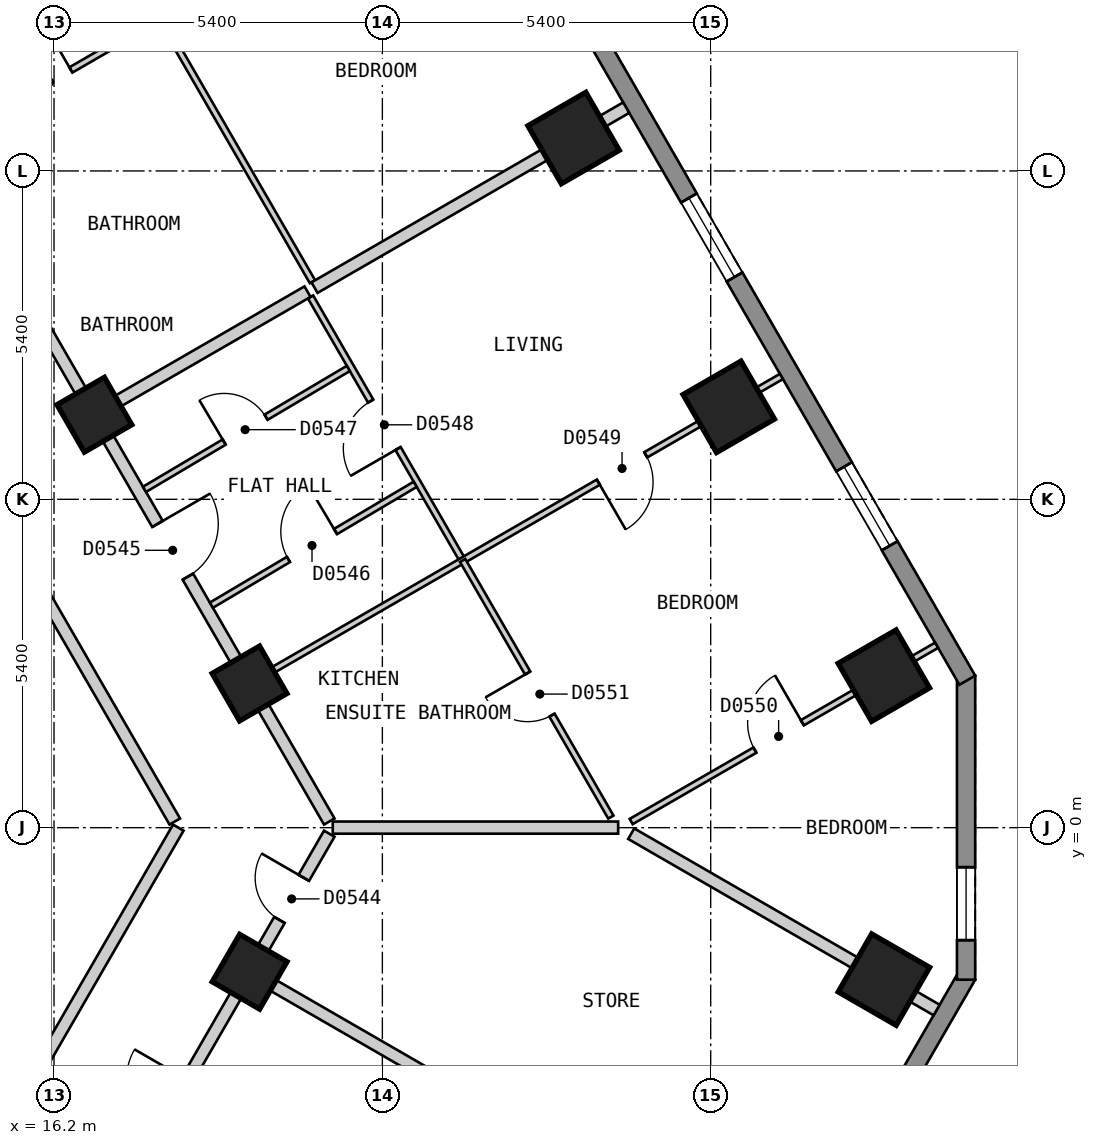
"""IFC4 building model, lengths in metres.
Left out: names, types, materials, properties, quantities, classifications, styles, units other than length and angle.
Written with IfcOpenShell. Run it as: python <this file> out.ifc"""

import sys

from ifc_helpers import new_model, si_unit, direction, frame, frame_2d, origin, origin_2d, place, context, subcontext, project, spatial, polyline, rectangle, outline, extrude, element, fill, save


model = new_model("IFC4")
c1 = context("Model", 3, precision=1e-05, world=origin(), true_north=direction((0.0, 1.0)))
c2 = subcontext(c1, "Body", "Model", "MODEL_VIEW")
j1 = project(units=[si_unit("LENGTHUNIT", "METRE"), si_unit("PLANEANGLEUNIT", "RADIAN")], contexts=[c1])
p1 = place(None, origin())
s1 = spatial("IfcSite", under=j1, at=p1, CompositionType="ELEMENT")
p2 = place(p1, origin())
s2 = spatial("IfcBuilding", under=s1, at=p2, CompositionType="ELEMENT")
p3 = place(p2, frame((0.0, 0.0, 44.4)))
s3 = spatial("IfcBuildingStorey", under=s2, at=p3, CompositionType="ELEMENT", Elevation=44.4)
for number, where, z_axis, x_axis in (
    (1, (29.849, -2.499, 0.0), (0.0, 0.0, 1.0), (0.5, 0.866, 0.0)),
    (2, (29.848, 2.5, 0.0), (0.0, 0.0, 1.0), (-0.5, 0.866, 0.0)),
    (3, (27.297, 6.921, 0.0), (0.0, 0.0, 1.0), (-0.5, 0.866, 0.0)),
    (4, (24.745, 11.341, 0.0), (0.0, 0.0, 1.0), (-0.5, 0.866, 0.0)),
):
    element("IfcColumn", number, at=place(p3, frame(where, z_axis=z_axis, x_axis=x_axis)), inside=s3, PredefinedType="COLUMN", context=c2, shape_type="SweptSolid", body=[
        extrude(rectangle(XDim=1.1, YDim=1.1, at=origin_2d()), origin(), (0.0, 0.0, 1.0), 3.0),
    ])
for number, where, z_axis, x_axis in (
    (5, (19.417, -2.369, 0.0), (0.0, 0.0, 1.0), (0.5, 0.866, 0.0)),
    (6, (19.416, 2.371, 0.0), (0.0, 0.0, 1.0), (-0.5, 0.866, 0.0)),
    (7, (16.864, 6.791, 0.0), (0.0, 0.0, 1.0), (-0.5, 0.866, 0.0)),
):
    element("IfcColumn", number, at=place(p3, frame(where, z_axis=z_axis, x_axis=x_axis)), inside=s3, PredefinedType="COLUMN", context=c2, shape_type="SweptSolid", body=[
        extrude(rectangle(XDim=0.9, YDim=0.9, at=origin_2d()), origin(), (0.0, 0.0, 1.0), 3.0),
    ])
p4 = place(p3, frame((17.71, -25.825, 0.0), z_axis=(0.0, 0.0, 1.0), x_axis=(0.500001938803, 0.866024284413, 0.0)))
e8 = element("IfcWall", 8, at=p4, inside=s3, PredefinedType="SOLIDWALL", context=c2, shape_type="SweptSolid", body=[
    extrude(outline(polyline([(0.0, -0.15), (27.02, -0.15), (26.94, 0.15), (0.08, 0.15), (0.0, -0.15)])), origin(), (0.0, 0.0, 1.0), 2.7),
])
p5 = place(p4, frame((2.553, 0.0, 0.15)))
e9 = element("IfcOpeningElement", 9, at=p5, cuts=e8, PredefinedType="OPENING", context=c2, shape_type="SweptSolid", body=[
    extrude(rectangle(XDim=1.5, YDim=2.1, at=frame_2d((0.75, 1.05))), frame((0.0, 0.16, 0.0), z_axis=(0.0, -1.0, 0.0), x_axis=(1.0, 0.0, 0.0)), (0.0, 0.0, 1.0), 0.32),
])
p6 = place(p4, frame((7.658, 0.0, 0.15)))
e10 = element("IfcOpeningElement", 10, at=p6, cuts=e8, PredefinedType="OPENING", context=c2, shape_type="SweptSolid", body=[
    extrude(rectangle(XDim=1.5, YDim=2.1, at=frame_2d((0.75, 1.05))), frame((0.0, 0.16, 0.0), z_axis=(0.0, -1.0, 0.0), x_axis=(1.0, 0.0, 0.0)), (0.0, 0.0, 1.0), 0.32),
])
p7 = place(p4, frame((12.761, 0.0, 0.15)))
e11 = element("IfcOpeningElement", 11, at=p7, cuts=e8, PredefinedType="OPENING", context=c2, shape_type="SweptSolid", body=[
    extrude(rectangle(XDim=1.5, YDim=2.1, at=frame_2d((0.75, 1.05))), frame((0.0, 0.16, 0.0), z_axis=(0.0, -1.0, 0.0), x_axis=(1.0, 0.0, 0.0)), (0.0, 0.0, 1.0), 0.32),
])
p8 = place(p4, frame((17.865, 0.0, 0.15)))
e12 = element("IfcOpeningElement", 12, at=p8, cuts=e8, PredefinedType="OPENING", context=c2, shape_type="SweptSolid", body=[
    extrude(rectangle(XDim=1.5, YDim=2.1, at=frame_2d((0.75, 1.05))), frame((0.0, 0.16, 0.0), z_axis=(0.0, -1.0, 0.0), x_axis=(1.0, 0.0, 0.0)), (0.0, 0.0, 1.0), 0.32),
])
p9 = place(p4, frame((22.969, 0.0, 0.15)))
e13 = element("IfcOpeningElement", 13, at=p9, cuts=e8, PredefinedType="OPENING", context=c2, shape_type="SweptSolid", body=[
    extrude(rectangle(XDim=1.5, YDim=2.1, at=frame_2d((0.75, 1.05))), frame((0.0, 0.16, 0.0), z_axis=(0.0, -1.0, 0.0), x_axis=(1.0, 0.0, 0.0)), (0.0, 0.0, 1.0), 0.32),
])
p10 = place(p3, frame((31.2, -2.5, 0.0), z_axis=(0.0, 0.0, 1.0), x_axis=(0.0, 1.0, 0.0)))
e14 = element("IfcWall", 14, at=p10, inside=s3, PredefinedType="SOLIDWALL", context=c2, shape_type="SweptSolid", body=[
    extrude(outline(polyline([(0.0, -0.15), (5.0, -0.15), (4.92, 0.15), (0.08, 0.15), (0.0, -0.15)])), origin(), (0.0, 0.0, 1.0), 2.7),
])
p11 = place(p10, frame((0.65, 0.0, 0.15)))
e15 = element("IfcOpeningElement", 15, at=p11, cuts=e14, PredefinedType="OPENING", context=c2, shape_type="SweptSolid", body=[
    extrude(rectangle(XDim=1.2, YDim=2.1, at=frame_2d((0.6, 1.05))), frame((0.0, 0.16, 0.0), z_axis=(0.0, -1.0, 0.0), x_axis=(1.0, 0.0, 0.0)), (0.0, 0.0, 1.0), 0.32),
])
p12 = place(p3, frame((31.22, 2.425, 0.0), z_axis=(0.0, 0.0, 1.0), x_axis=(-0.500001938803, 0.866024284413, 0.0)))
e16 = element("IfcWall", 16, at=p12, inside=s3, PredefinedType="SOLIDWALL", context=c2, shape_type="SweptSolid", body=[
    extrude(outline(polyline([(0.0, -0.15), (27.02, -0.15), (26.94, 0.15), (0.08, 0.15), (0.0, -0.15)])), origin(), (0.0, 0.0, 1.0), 2.7),
])
p13 = place(p12, frame((2.553, 0.0, 0.15)))
e17 = element("IfcOpeningElement", 17, at=p13, cuts=e16, PredefinedType="OPENING", context=c2, shape_type="SweptSolid", body=[
    extrude(rectangle(XDim=1.5, YDim=2.1, at=frame_2d((0.75, 1.05))), frame((0.0, 0.16, 0.0), z_axis=(0.0, -1.0, 0.0), x_axis=(1.0, 0.0, 0.0)), (0.0, 0.0, 1.0), 0.32),
])
p14 = place(p12, frame((7.657, 0.0, 0.15)))
e18 = element("IfcOpeningElement", 18, at=p14, cuts=e16, PredefinedType="OPENING", context=c2, shape_type="SweptSolid", body=[
    extrude(rectangle(XDim=1.5, YDim=2.1, at=frame_2d((0.75, 1.05))), frame((0.0, 0.16, 0.0), z_axis=(0.0, -1.0, 0.0), x_axis=(1.0, 0.0, 0.0)), (0.0, 0.0, 1.0), 0.32),
])
p15 = place(p12, frame((12.761, 0.0, 0.15)))
e19 = element("IfcOpeningElement", 19, at=p15, cuts=e16, PredefinedType="OPENING", context=c2, shape_type="SweptSolid", body=[
    extrude(rectangle(XDim=1.5, YDim=2.1, at=frame_2d((0.75, 1.05))), frame((0.0, 0.16, 0.0), z_axis=(0.0, -1.0, 0.0), x_axis=(1.0, 0.0, 0.0)), (0.0, 0.0, 1.0), 0.32),
])
p16 = place(p12, frame((17.865, 0.0, 0.15)))
e20 = element("IfcOpeningElement", 20, at=p16, cuts=e16, PredefinedType="OPENING", context=c2, shape_type="SweptSolid", body=[
    extrude(rectangle(XDim=1.5, YDim=2.1, at=frame_2d((0.75, 1.05))), frame((0.0, 0.16, 0.0), z_axis=(0.0, -1.0, 0.0), x_axis=(1.0, 0.0, 0.0)), (0.0, 0.0, 1.0), 0.32),
])
p17 = place(p12, frame((22.969, 0.0, 0.15)))
e21 = element("IfcOpeningElement", 21, at=p17, cuts=e16, PredefinedType="OPENING", context=c2, shape_type="SweptSolid", body=[
    extrude(rectangle(XDim=1.5, YDim=2.1, at=frame_2d((0.75, 1.05))), frame((0.0, 0.16, 0.0), z_axis=(0.0, -1.0, 0.0), x_axis=(1.0, 0.0, 0.0)), (0.0, 0.0, 1.0), 0.32),
])
p18 = place(p3, frame((9.18, 15.7, 0.0), z_axis=(0.0, 0.0, 1.0), x_axis=(0.500003652032, -0.866023295272, 0.0)))
e22 = element("IfcWall", 22, at=p18, inside=s3, PredefinedType="PARTITIONING", context=c2, shape_type="SweptSolid", body=[
    extrude(rectangle(XDim=18.012, YDim=0.2, at=frame_2d((9.006, 0.0))), origin(), (0.0, 0.0, 1.0), 2.7),
])
p19 = place(p18, frame((8.556, 0.0, 0.0)))
e23 = element("IfcOpeningElement", 23, at=p19, cuts=e22, PredefinedType="OPENING", context=c2, shape_type="SweptSolid", body=[
    extrude(rectangle(XDim=0.9, YDim=2.1, at=frame_2d((0.45, 1.05))), frame((0.0, 0.11, 0.0), z_axis=(0.0, -1.0, 0.0), x_axis=(1.0, 0.0, 0.0)), (0.0, 0.0, 1.0), 0.22),
])
p20 = place(p3, frame((10.45, 17.9, 0.0), z_axis=(0.0, 0.0, 1.0), x_axis=(0.500034352617, -0.866005569383, 0.0)))
e24 = element("IfcWall", 24, at=p20, inside=s3, PredefinedType="PARTITIONING", context=c2, shape_type="SweptSolid", body=[
    extrude(rectangle(XDim=20.553, YDim=0.2, at=frame_2d((10.276, 0.0))), origin(), (0.0, 0.0, 1.0), 2.7),
])
p21 = place(p20, frame((14.902, 0.0, 0.0)))
e25 = element("IfcOpeningElement", 25, at=p21, cuts=e24, PredefinedType="OPENING", context=c2, shape_type="SweptSolid", body=[
    extrude(rectangle(XDim=1.0, YDim=2.1, at=frame_2d((0.5, 1.05))), frame((0.0, 0.11, 0.0), z_axis=(0.0, -1.0, 0.0), x_axis=(1.0, 0.0, 0.0)), (0.0, 0.0, 1.0), 0.22),
])
p22 = place(p20, frame((4.671, 0.0, 0.0)))
e26 = element("IfcOpeningElement", 26, at=p22, cuts=e24, PredefinedType="OPENING", context=c2, shape_type="SweptSolid", body=[
    extrude(rectangle(XDim=1.0, YDim=2.1, at=frame_2d((0.5, 1.05))), frame((0.0, 0.11, 0.0), z_axis=(0.0, -1.0, 0.0), x_axis=(1.0, 0.0, 0.0)), (0.0, 0.0, 1.0), 0.22),
])
p23 = place(p3, frame((15.6, -4.579, 0.0), z_axis=(0.0, 0.0, 1.0), x_axis=(0.499927597274, 0.866067201483, 0.0)))
e27 = element("IfcWall", 27, at=p23, inside=s3, PredefinedType="PARTITIONING", context=c2, shape_type="SweptSolid", body=[
    extrude(rectangle(XDim=5.288, YDim=0.2, at=frame_2d((2.644, 0.0))), origin(), (0.0, 0.0, 1.0), 2.7),
])
p24 = place(p3, frame((15.707, -8.794, 0.0), z_axis=(0.0, 0.0, 1.0), x_axis=(0.50000451406, 0.866022797575, 0.0)))
e28 = element("IfcWall", 28, at=p24, inside=s3, PredefinedType="PARTITIONING", context=c2, shape_type="SweptSolid", body=[
    extrude(rectangle(XDim=10.04, YDim=0.2, at=frame_2d((5.02, 0.0))), origin(), (0.0, 0.0, 1.0), 2.7),
])
p25 = place(p24, frame((4.367, 0.0, 0.0)))
e29 = element("IfcOpeningElement", 29, at=p25, cuts=e28, PredefinedType="OPENING", context=c2, shape_type="SweptSolid", body=[
    extrude(rectangle(XDim=1.0, YDim=2.1, at=frame_2d((0.5, 1.05))), frame((0.0, 0.11, 0.0), z_axis=(0.0, -1.0, 0.0), x_axis=(1.0, 0.0, 0.0)), (0.0, 0.0, 1.0), 0.22),
])
p26 = place(p24, frame((8.402, 0.0, 0.0)))
e30 = element("IfcOpeningElement", 30, at=p26, cuts=e28, PredefinedType="OPENING", context=c2, shape_type="SweptSolid", body=[
    extrude(rectangle(XDim=0.8, YDim=2.1, at=frame_2d((0.4, 1.05))), frame((0.0, 0.11, 0.0), z_axis=(0.0, -1.0, 0.0), x_axis=(1.0, 0.0, 0.0)), (0.0, 0.0, 1.0), 0.22),
])
p27 = place(p3, frame((20.419, 8.728, 0.0), z_axis=(0.0, 0.0, 1.0), x_axis=(0.499958946799, -0.866049104564, 0.0)))
e31 = element("IfcWall", 31, at=p27, inside=s3, PredefinedType="PARTITIONING", context=c2, shape_type="SweptSolid", body=[
    extrude(rectangle(XDim=5.004, YDim=0.1, at=frame_2d((2.502, 0.0))), origin(), (0.0, 0.0, 1.0), 2.7),
])
p28 = place(p27, frame((1.978, 0.0, 0.0)))
e32 = element("IfcOpeningElement", 32, at=p28, cuts=e31, PredefinedType="OPENING", context=c2, shape_type="SweptSolid", body=[
    extrude(rectangle(XDim=0.9, YDim=2.1, at=frame_2d((0.45, 1.05))), frame((0.0, 0.06, 0.0), z_axis=(0.0, -1.0, 0.0), x_axis=(1.0, 0.0, 0.0)), (0.0, 0.0, 1.0), 0.12),
])
p29 = place(p3, frame((12.875, 22.1, 0.0), z_axis=(0.0, 0.0, 1.0), x_axis=(0.499994897061, -0.866028349948, 0.0)))
e33 = element("IfcWall", 33, at=p29, inside=s3, PredefinedType="PARTITIONING", context=c2, shape_type="SweptSolid", body=[
    extrude(rectangle(XDim=15.152, YDim=0.1, at=frame_2d((7.576, 0.0))), origin(), (0.0, 0.0, 1.0), 2.7),
])
p30 = place(p29, frame((7.146, 0.0, 0.0)))
e34 = element("IfcOpeningElement", 34, at=p30, cuts=e33, PredefinedType="OPENING", context=c2, shape_type="SweptSolid", body=[
    extrude(rectangle(XDim=0.9, YDim=2.1, at=frame_2d((0.45, 1.05))), frame((0.0, 0.06, 0.0), z_axis=(0.0, -1.0, 0.0), x_axis=(1.0, 0.0, 0.0)), (0.0, 0.0, 1.0), 0.12),
])
p31 = place(p3, frame((19.503, 2.421, 0.0), z_axis=(0.0, 0.0, 1.0), x_axis=(0.866065245018, 0.499930986609, 0.0)))
e35 = element("IfcWall", 35, at=p31, inside=s3, PredefinedType="PARTITIONING", context=c2, shape_type="SweptSolid", body=[
    extrude(rectangle(XDim=10.0, YDim=0.1, at=frame_2d((5.0, 0.0))), origin(), (0.0, 0.0, 1.0), 2.7),
])
p32 = place(p31, frame((6.523, 0.0, 0.0)))
e36 = element("IfcOpeningElement", 36, at=p32, cuts=e35, PredefinedType="OPENING", context=c2, shape_type="SweptSolid", body=[
    extrude(rectangle(XDim=0.9, YDim=2.1, at=frame_2d((0.45, 1.05))), frame((0.0, 0.06, 0.0), z_axis=(0.0, -1.0, 0.0), x_axis=(1.0, 0.0, 0.0)), (0.0, 0.0, 1.0), 0.12),
])
p33 = place(p3, frame((25.692, 0.101, 0.0), z_axis=(0.0, 0.0, 1.0), x_axis=(0.866116197112, 0.49984270836, 0.0)))
e37 = element("IfcWall", 37, at=p33, inside=s3, PredefinedType="PARTITIONING", context=c2, shape_type="SweptSolid", body=[
    extrude(rectangle(XDim=5.8, YDim=0.1, at=frame_2d((2.9, 0.0))), origin(), (0.0, 0.0, 1.0), 2.7),
])
p34 = place(p33, frame((2.35, 0.0, 0.0)))
e38 = element("IfcOpeningElement", 38, at=p34, cuts=e37, PredefinedType="OPENING", context=c2, shape_type="SweptSolid", body=[
    extrude(rectangle(XDim=0.9, YDim=2.1, at=frame_2d((0.45, 1.05))), frame((0.0, 0.06, 0.0), z_axis=(0.0, -1.0, 0.0), x_axis=(1.0, 0.0, 0.0)), (0.0, 0.0, 1.0), 0.12),
])
p35 = place(p3, frame((14.399, 11.261, 0.0), z_axis=(0.0, 0.0, 1.0), x_axis=(0.865980278416, 0.500078151287, 0.0)))
e39 = element("IfcWall", 39, at=p35, inside=s3, PredefinedType="PARTITIONING", context=c2, shape_type="SweptSolid", body=[
    extrude(rectangle(XDim=4.099, YDim=0.1, at=frame_2d((2.05, 0.0))), origin(), (0.0, 0.0, 1.0), 2.7),
])
p36 = place(p35, frame((1.6, 0.0, 0.0)))
e40 = element("IfcOpeningElement", 40, at=p36, cuts=e39, PredefinedType="OPENING", context=c2, shape_type="SweptSolid", body=[
    extrude(rectangle(XDim=0.8, YDim=2.1, at=frame_2d((0.4, 1.05))), frame((0.0, 0.06, 0.0), z_axis=(0.0, -1.0, 0.0), x_axis=(1.0, 0.0, 0.0)), (0.0, 0.0, 1.0), 0.12),
])
p37 = place(p3, frame((17.688, 5.564, 0.0), z_axis=(0.0, 0.0, 1.0), x_axis=(0.860107296662, 0.510113162179, 0.0)))
e41 = element("IfcWall", 41, at=p37, inside=s3, PredefinedType="PARTITIONING", context=c2, shape_type="SweptSolid", body=[
    extrude(rectangle(XDim=3.897, YDim=0.1, at=frame_2d((1.949, 0.0))), origin(), (0.0, 0.0, 1.0), 2.7),
])
p38 = place(p37, frame((1.524, 0.0, 0.0)))
e42 = element("IfcOpeningElement", 42, at=p38, cuts=e41, PredefinedType="OPENING", context=c2, shape_type="SweptSolid", body=[
    extrude(rectangle(XDim=0.8, YDim=2.1, at=frame_2d((0.4, 1.05))), frame((0.0, 0.06, 0.0), z_axis=(0.0, -1.0, 0.0), x_axis=(1.0, 0.0, 0.0)), (0.0, 0.0, 1.0), 0.12),
])
p39 = place(p3, frame((18.788, 3.659, 0.0), z_axis=(0.0, 0.0, 1.0), x_axis=(0.860090994311, 0.510140648749, 0.0)))
e43 = element("IfcWall", 43, at=p39, inside=s3, PredefinedType="PARTITIONING", context=c2, shape_type="SweptSolid", body=[
    extrude(rectangle(XDim=3.897, YDim=0.1, at=frame_2d((1.948, 0.0))), origin(), (0.0, 0.0, 1.0), 2.7),
])
p40 = place(p39, frame((1.474, 0.0, 0.0)))
e44 = element("IfcOpeningElement", 44, at=p40, cuts=e43, PredefinedType="OPENING", context=c2, shape_type="SweptSolid", body=[
    extrude(rectangle(XDim=0.9, YDim=2.1, at=frame_2d((0.45, 1.05))), frame((0.0, 0.06, 0.0), z_axis=(0.0, -1.0, 0.0), x_axis=(1.0, 0.0, 0.0)), (0.0, 0.0, 1.0), 0.12),
])
p41 = place(p3, frame((19.503, -2.419, 0.0), z_axis=(0.0, 0.0, 1.0), x_axis=(0.866022959057, -0.500004234368, 0.0)))
e45 = element("IfcWall", 45, at=p41, inside=s3, PredefinedType="PARTITIONING", context=c2, shape_type="SweptSolid", body=[
    extrude(rectangle(XDim=10.0, YDim=0.2, at=frame_2d((5.0, 0.0))), origin(), (0.0, 0.0, 1.0), 2.7),
])
p42 = place(p3, frame((25.693, -0.099, 0.0), z_axis=(0.0, 0.0, 1.0), x_axis=(0.866032775405, -0.499987231761, 0.0)))
e46 = element("IfcWall", 46, at=p42, inside=s3, PredefinedType="PARTITIONING", context=c2, shape_type="SweptSolid", body=[
    extrude(rectangle(XDim=5.8, YDim=0.2, at=frame_2d((2.9, 0.0))), origin(), (0.0, 0.0, 1.0), 2.7),
])
p43 = place(p3, frame((20.784, 0.001, 0.0), z_axis=(0.0, 0.0, 1.0), x_axis=(1.0, 0.0, 0.0)))
e47 = element("IfcWall", 47, at=p43, inside=s3, PredefinedType="PARTITIONING", context=c2, shape_type="SweptSolid", body=[
    extrude(rectangle(XDim=4.694, YDim=0.2, at=frame_2d((2.347, 0.0))), origin(), (0.0, 0.0, 1.0), 2.7),
])
p44 = place(p3, frame((16.95, 6.841, 0.0), z_axis=(0.0, 0.0, 1.0), x_axis=(0.866031112038, 0.499990112884, 0.0)))
e48 = element("IfcWall", 48, at=p44, inside=s3, PredefinedType="PARTITIONING", context=c2, shape_type="SweptSolid", body=[
    extrude(rectangle(XDim=3.948, YDim=0.2, at=frame_2d((1.974, 0.0))), origin(), (0.0, 0.0, 1.0), 2.7),
])
p45 = place(p3, frame((20.484, 8.881, 0.0), z_axis=(0.0, 0.0, 1.0), x_axis=(0.866000821391, 0.500042575537, 0.0)))
e49 = element("IfcWall", 49, at=p45, inside=s3, PredefinedType="PARTITIONING", context=c2, shape_type="SweptSolid", body=[
    extrude(rectangle(XDim=5.919, YDim=0.2, at=frame_2d((2.96, 0.0))), origin(), (0.0, 0.0, 1.0), 2.7),
])
p46 = place(p3, frame((22.921, 4.394, 0.0), z_axis=(0.0, 0.0, 1.0), x_axis=(0.500093956194, -0.865971151354, 0.0)))
e50 = element("IfcWall", 50, at=p46, inside=s3, PredefinedType="PARTITIONING", context=c2, shape_type="SweptSolid", body=[
    extrude(rectangle(XDim=4.873, YDim=0.1, at=frame_2d((2.437, 0.0))), origin(), (0.0, 0.0, 1.0), 2.7),
])
p47 = place(p46, frame((2.137, 0.0, 0.0)))
e51 = element("IfcOpeningElement", 51, at=p47, cuts=e50, PredefinedType="OPENING", context=c2, shape_type="SweptSolid", body=[
    extrude(rectangle(XDim=0.8, YDim=2.1, at=frame_2d((0.4, 1.05))), frame((0.0, 0.06, 0.0), z_axis=(0.0, -1.0, 0.0), x_axis=(1.0, 0.0, 0.0)), (0.0, 0.0, 1.0), 0.12),
])
p48 = place(p11, origin())
e52 = element("IfcWindow", 52, at=p48, inside=s3, PartitioningType="SINGLE_PANEL", PredefinedType="WINDOW", context=c2, shape_type="SweptSolid", body=[
    extrude(rectangle(XDim=1.2, YDim=2.1, at=frame_2d((0.6, 1.05))), frame((0.0, 0.03, 0.0), z_axis=(0.0, -1.0, 0.0), x_axis=(1.0, 0.0, 0.0)), (0.0, 0.0, 1.0), 0.06),
])
fill(e15, e52)
p49 = place(p13, origin())
e53 = element("IfcWindow", 53, at=p49, inside=s3, PartitioningType="SINGLE_PANEL", PredefinedType="WINDOW", context=c2, shape_type="SweptSolid", body=[
    extrude(rectangle(XDim=1.5, YDim=2.1, at=frame_2d((0.75, 1.05))), frame((0.0, 0.03, 0.0), z_axis=(0.0, -1.0, 0.0), x_axis=(1.0, 0.0, 0.0)), (0.0, 0.0, 1.0), 0.06),
])
fill(e17, e53)
p50 = place(p14, origin())
e54 = element("IfcWindow", 54, at=p50, inside=s3, PartitioningType="SINGLE_PANEL", PredefinedType="WINDOW", context=c2, shape_type="SweptSolid", body=[
    extrude(rectangle(XDim=1.5, YDim=2.1, at=frame_2d((0.75, 1.05))), frame((0.0, 0.03, 0.0), z_axis=(0.0, -1.0, 0.0), x_axis=(1.0, 0.0, 0.0)), (0.0, 0.0, 1.0), 0.06),
])
fill(e18, e54)
p51 = place(p26, origin())
e55 = element("IfcDoor", 55, at=p51, inside=s3, OperationType="SINGLE_SWING_RIGHT", PredefinedType="DOOR", context=c2, shape_type="SweptSolid", body=[
    extrude(rectangle(XDim=0.8, YDim=2.1, at=frame_2d((0.4, 1.05))), frame((0.0, 0.025, 0.0), z_axis=(0.0, -1.0, 0.0), x_axis=(1.0, 0.0, 0.0)), (0.0, 0.0, 1.0), 0.05),
])
fill(e30, e55)
p52 = place(p21, origin())
e56 = element("IfcDoor", 56, at=p52, inside=s3, OperationType="SINGLE_SWING_LEFT", PredefinedType="DOOR", context=c2, shape_type="SweptSolid", body=[
    extrude(rectangle(XDim=1.0, YDim=2.1, at=frame_2d((0.5, 1.05))), frame((0.0, 0.025, 0.0), z_axis=(0.0, -1.0, 0.0), x_axis=(1.0, 0.0, 0.0)), (0.0, 0.0, 1.0), 0.05),
])
fill(e25, e56)
p53 = place(p40, origin())
e57 = element("IfcDoor", 57, at=p53, inside=s3, OperationType="SINGLE_SWING_RIGHT", PredefinedType="DOOR", context=c2, shape_type="SweptSolid", body=[
    extrude(rectangle(XDim=0.9, YDim=2.1, at=frame_2d((0.45, 1.05))), frame((0.0, 0.025, 0.0), z_axis=(0.0, -1.0, 0.0), x_axis=(1.0, 0.0, 0.0)), (0.0, 0.0, 1.0), 0.05),
])
fill(e44, e57)
p54 = place(p38, origin())
e58 = element("IfcDoor", 58, at=p54, inside=s3, OperationType="SINGLE_SWING_LEFT", PredefinedType="DOOR", context=c2, shape_type="SweptSolid", body=[
    extrude(rectangle(XDim=0.8, YDim=2.1, at=frame_2d((0.4, 1.05))), frame((0.0, 0.025, 0.0), z_axis=(0.0, -1.0, 0.0), x_axis=(1.0, 0.0, 0.0)), (0.0, 0.0, 1.0), 0.05),
])
fill(e42, e58)
p55 = place(p28, origin())
e59 = element("IfcDoor", 59, at=p55, inside=s3, OperationType="SINGLE_SWING_RIGHT", PredefinedType="DOOR", context=c2, shape_type="SweptSolid", body=[
    extrude(rectangle(XDim=0.9, YDim=2.1, at=frame_2d((0.45, 1.05))), frame((0.0, 0.025, 0.0), z_axis=(0.0, -1.0, 0.0), x_axis=(1.0, 0.0, 0.0)), (0.0, 0.0, 1.0), 0.05),
])
fill(e32, e59)
p56 = place(p32, origin())
e60 = element("IfcDoor", 60, at=p56, inside=s3, OperationType="SINGLE_SWING_LEFT", PredefinedType="DOOR", context=c2, shape_type="SweptSolid", body=[
    extrude(rectangle(XDim=0.9, YDim=2.1, at=frame_2d((0.45, 1.05))), frame((0.0, 0.025, 0.0), z_axis=(0.0, -1.0, 0.0), x_axis=(1.0, 0.0, 0.0)), (0.0, 0.0, 1.0), 0.05),
])
fill(e36, e60)
p57 = place(p34, origin())
e61 = element("IfcDoor", 61, at=p57, inside=s3, OperationType="SINGLE_SWING_RIGHT", PredefinedType="DOOR", context=c2, shape_type="SweptSolid", body=[
    extrude(rectangle(XDim=0.9, YDim=2.1, at=frame_2d((0.45, 1.05))), frame((0.0, 0.025, 0.0), z_axis=(0.0, -1.0, 0.0), x_axis=(1.0, 0.0, 0.0)), (0.0, 0.0, 1.0), 0.05),
])
fill(e38, e61)
p58 = place(p47, origin())
e62 = element("IfcDoor", 62, at=p58, inside=s3, OperationType="SINGLE_SWING_LEFT", PredefinedType="DOOR", context=c2, shape_type="SweptSolid", body=[
    extrude(rectangle(XDim=0.8, YDim=2.1, at=frame_2d((0.4, 1.05))), frame((0.0, 0.025, 0.0), z_axis=(0.0, -1.0, 0.0), x_axis=(1.0, 0.0, 0.0)), (0.0, 0.0, 1.0), 0.05),
])
fill(e51, e62)
p59 = place(p36, origin())
e63 = element("IfcDoor", 63, at=p59, inside=s3, OperationType="SINGLE_SWING_RIGHT", PredefinedType="DOOR", context=c2, shape_type="SweptSolid", body=[
    extrude(rectangle(XDim=0.8, YDim=2.1, at=frame_2d((0.4, 1.05))), frame((0.0, 0.025, 0.0), z_axis=(0.0, -1.0, 0.0), x_axis=(1.0, 0.0, 0.0)), (0.0, 0.0, 1.0), 0.05),
])
fill(e40, e63)
save(model, sys.argv[1])
